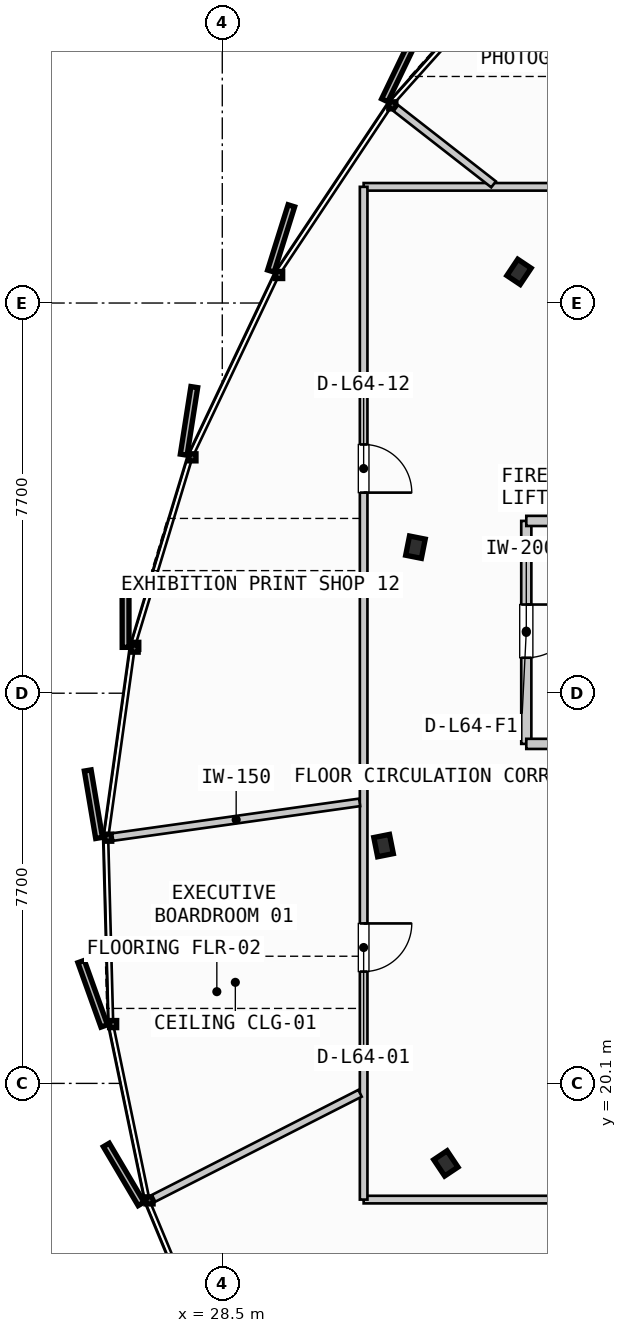
"""IFC4 building model, lengths in metres.
Left out: names, types, materials, properties, quantities, classifications, styles, units other than length and angle.
Written with IfcOpenShell. Run it as: python <this file> out.ifc"""

import sys

from ifc_helpers import new_model, si_unit, direction, frame, frame_2d, origin, origin_2d, place, context, subcontext, project, spatial, rectangle, i_section, extrude, source, transform, mapped, element, fill, save


model = new_model("IFC4")
c1 = context("Model", 3, precision=1e-05, world=origin(), true_north=direction((0.0, 1.0)))
c2 = subcontext(c1, "Body", "Model", "MODEL_VIEW")
j1 = project(units=[si_unit("LENGTHUNIT", "METRE"), si_unit("PLANEANGLEUNIT", "RADIAN")], contexts=[c1])
p1 = place(None, origin())
s1 = spatial("IfcSite", under=j1, at=p1, CompositionType="ELEMENT")
p2 = place(p1, origin())
s2 = spatial("IfcBuilding", under=s1, at=p2, CompositionType="ELEMENT")
p3 = place(p2, frame((0.0, 0.0, 245.65)))
s3 = spatial("IfcBuildingStorey", under=s2, at=p3, CompositionType="ELEMENT", Elevation=245.65)
m1 = source(origin(), c2, "Body", "SweptSolid", [
    extrude(i_section(OverallWidth=0.387, OverallDepth=0.316, WebThickness=0.019, FlangeThickness=0.028, FilletRadius=0.015, at=origin_2d()), origin(), (0.0, 0.0, 1.0), 3.21),
])
for number, where, z_axis, x_axis in (
    (1, (34.356, 36.115, 0.0), (0.0, 0.0, 1.0), (-0.831, 0.556, 0.0)),
    (2, (32.312, 30.682, 0.0), (0.0, 0.0, 1.0), (-0.981, 0.195, 0.0)),
    (3, (31.683, 24.793, 0.0), (0.0, 0.0, 1.0), (-0.981, -0.195, 0.0)),
    (4, (32.913, 18.521, 0.0), (0.0, 0.0, 1.0), (-0.831, -0.556, 0.0)),
):
    element("IfcColumn", number, at=place(p3, frame(where, z_axis=z_axis, x_axis=x_axis)), inside=s3, PredefinedType="COLUMN", context=c2, shape_type="MappedRepresentation", body=[
        mapped(m1, transform((0.0, 0.0, 0.0), scale=1.0)),
    ])
p4 = place(p3, frame((34.5, 31.2, 0.0), z_axis=(0.0, 0.0, 1.0), x_axis=(0.0, -1.0, 0.0)))
e5 = element("IfcWall", 5, at=p4, inside=s3, PredefinedType="PARTITIONING", context=c2, shape_type="SweptSolid", body=[
    extrude(rectangle(XDim=4.4, YDim=0.2, at=frame_2d((2.2, 0.0))), origin(), (0.0, 0.0, 1.0), 2.28),
])
p5 = place(p4, frame((1.65, 0.0, 0.0)))
e6 = element("IfcOpeningElement", 6, at=p5, cuts=e5, PredefinedType="OPENING", context=c2, shape_type="SweptSolid", body=[
    extrude(rectangle(XDim=1.05, YDim=2.15, at=frame_2d((0.525, 1.075))), frame((0.0, 0.11, 0.0), z_axis=(0.0, -1.0, 0.0), x_axis=(1.0, 0.0, 0.0)), (0.0, 0.0, 1.0), 0.22),
])
for number, where, z_axis, x_axis in (
    (7, (34.5, 26.8, 0.0), (0.0, 0.0, 1.0), (1.0, 0.0, 0.0)),
    (8, (34.5, 31.2, 0.0), (0.0, 0.0, 1.0), (1.0, 0.0, 0.0)),
):
    element("IfcWall", number, at=place(p3, frame(where, z_axis=z_axis, x_axis=x_axis)), inside=s3, PredefinedType="PARTITIONING", context=c2, shape_type="SweptSolid", body=[
        extrude(rectangle(XDim=3.265, YDim=0.2, at=frame_2d((1.632, 0.0))), origin(), (0.0, 0.0, 1.0), 2.28),
    ])
p6 = place(p3, frame((31.29, 17.807, 0.0), z_axis=(0.0, 0.0, 1.0), x_axis=(1.0, 0.0, 0.0)))
e9 = element("IfcWall", 9, at=p6, inside=s3, PredefinedType="PARTITIONING", context=c2, shape_type="SweptSolid", body=[
    extrude(rectangle(XDim=30.274, YDim=0.15, at=frame_2d((15.137, 0.0))), origin(), (0.0, 0.0, 1.0), 2.28),
])
p7 = place(p6, frame((4.734, 0.0, 0.0)))
e10 = element("IfcOpeningElement", 10, at=p7, cuts=e9, PredefinedType="OPENING", context=c2, shape_type="SweptSolid", body=[
    extrude(rectangle(XDim=0.95, YDim=2.15, at=frame_2d((0.475, 1.075))), frame((0.0, 0.085, 0.0), z_axis=(0.0, -1.0, 0.0), x_axis=(1.0, 0.0, 0.0)), (0.0, 0.0, 1.0), 0.17),
])
p8 = place(p6, frame((11.892, 0.0, 0.0)))
e11 = element("IfcOpeningElement", 11, at=p8, cuts=e9, PredefinedType="OPENING", context=c2, shape_type="SweptSolid", body=[
    extrude(rectangle(XDim=0.95, YDim=2.15, at=frame_2d((0.475, 1.075))), frame((0.0, 0.085, 0.0), z_axis=(0.0, -1.0, 0.0), x_axis=(1.0, 0.0, 0.0)), (0.0, 0.0, 1.0), 0.17),
])
p9 = place(p6, frame((17.453, 0.0, 0.0)))
e12 = element("IfcOpeningElement", 12, at=p9, cuts=e9, PredefinedType="OPENING", context=c2, shape_type="SweptSolid", body=[
    extrude(rectangle(XDim=0.95, YDim=2.15, at=frame_2d((0.475, 1.075))), frame((0.0, 0.085, 0.0), z_axis=(0.0, -1.0, 0.0), x_axis=(1.0, 0.0, 0.0)), (0.0, 0.0, 1.0), 0.17),
])
p10 = place(p6, frame((24.251, 0.0, 0.0)))
e13 = element("IfcOpeningElement", 13, at=p10, cuts=e9, PredefinedType="OPENING", context=c2, shape_type="SweptSolid", body=[
    extrude(rectangle(XDim=0.95, YDim=2.15, at=frame_2d((0.475, 1.075))), frame((0.0, 0.085, 0.0), z_axis=(0.0, -1.0, 0.0), x_axis=(1.0, 0.0, 0.0)), (0.0, 0.0, 1.0), 0.17),
])
p11 = place(p3, frame((61.564, 37.793, 0.0), z_axis=(0.0, 0.0, 1.0), x_axis=(-1.0, 0.0, 0.0)))
e14 = element("IfcWall", 14, at=p11, inside=s3, PredefinedType="PARTITIONING", context=c2, shape_type="SweptSolid", body=[
    extrude(rectangle(XDim=30.274, YDim=0.15, at=frame_2d((15.137, 0.0))), origin(), (0.0, 0.0, 1.0), 2.28),
])
p12 = place(p11, frame((5.589, 0.0, 0.0)))
e15 = element("IfcOpeningElement", 15, at=p12, cuts=e14, PredefinedType="OPENING", context=c2, shape_type="SweptSolid", body=[
    extrude(rectangle(XDim=0.95, YDim=2.15, at=frame_2d((0.475, 1.075))), frame((0.0, 0.085, 0.0), z_axis=(0.0, -1.0, 0.0), x_axis=(1.0, 0.0, 0.0)), (0.0, 0.0, 1.0), 0.17),
])
p13 = place(p11, frame((14.743, 0.0, 0.0)))
e16 = element("IfcOpeningElement", 16, at=p13, cuts=e14, PredefinedType="OPENING", context=c2, shape_type="SweptSolid", body=[
    extrude(rectangle(XDim=0.95, YDim=2.15, at=frame_2d((0.475, 1.075))), frame((0.0, 0.085, 0.0), z_axis=(0.0, -1.0, 0.0), x_axis=(1.0, 0.0, 0.0)), (0.0, 0.0, 1.0), 0.17),
])
p14 = place(p11, frame((23.423, 0.0, 0.0)))
e17 = element("IfcOpeningElement", 17, at=p14, cuts=e14, PredefinedType="OPENING", context=c2, shape_type="SweptSolid", body=[
    extrude(rectangle(XDim=0.95, YDim=2.15, at=frame_2d((0.475, 1.075))), frame((0.0, 0.085, 0.0), z_axis=(0.0, -1.0, 0.0), x_axis=(1.0, 0.0, 0.0)), (0.0, 0.0, 1.0), 0.17),
])
p15 = place(p3, frame((31.29, 37.793, 0.0), z_axis=(0.0, 0.0, 1.0), x_axis=(0.0, -1.0, 0.0)))
e18 = element("IfcWall", 18, at=p15, inside=s3, PredefinedType="PARTITIONING", context=c2, shape_type="SweptSolid", body=[
    extrude(rectangle(XDim=19.986, YDim=0.15, at=frame_2d((9.993, 0.0))), origin(), (0.0, 0.0, 1.0), 2.28),
])
p16 = place(p15, frame((14.536, 0.0, 0.0)))
e19 = element("IfcOpeningElement", 19, at=p16, cuts=e18, PredefinedType="OPENING", context=c2, shape_type="SweptSolid", body=[
    extrude(rectangle(XDim=0.95, YDim=2.15, at=frame_2d((0.475, 1.075))), frame((0.0, 0.085, 0.0), z_axis=(0.0, -1.0, 0.0), x_axis=(1.0, 0.0, 0.0)), (0.0, 0.0, 1.0), 0.17),
])
p17 = place(p15, frame((5.084, 0.0, 0.0)))
e20 = element("IfcOpeningElement", 20, at=p17, cuts=e18, PredefinedType="OPENING", context=c2, shape_type="SweptSolid", body=[
    extrude(rectangle(XDim=0.95, YDim=2.15, at=frame_2d((0.475, 1.075))), frame((0.0, 0.085, 0.0), z_axis=(0.0, -1.0, 0.0), x_axis=(1.0, 0.0, 0.0)), (0.0, 0.0, 1.0), 0.17),
])
p18 = place(p3, frame((31.211, 25.646, 0.0), z_axis=(0.0, 0.0, 1.0), x_axis=(-0.990284031465, -0.139059472982, 0.0)))
e21 = element("IfcWall", 21, at=p18, inside=s3, PredefinedType="PARTITIONING", context=c2, shape_type="SweptSolid", body=[
    extrude(rectangle(XDim=4.921, YDim=0.15, at=frame_2d((2.46, 0.0))), origin(), (0.0, 0.0, 1.0), 2.28),
])
p19 = place(p3, frame((31.219, 19.905, 0.0), z_axis=(0.0, 0.0, 1.0), x_axis=(-0.891296966011, -0.453420024238, 0.0)))
e22 = element("IfcWall", 22, at=p19, inside=s3, PredefinedType="PARTITIONING", context=c2, shape_type="SweptSolid", body=[
    extrude(rectangle(XDim=4.571, YDim=0.15, at=frame_2d((2.285, 0.0))), origin(), (0.0, 0.0, 1.0), 2.28),
])
p20 = place(p3, frame((33.854, 37.842, 0.0), z_axis=(0.0, 0.0, 1.0), x_axis=(-0.788469366892, 0.61507402601, 0.0)))
e23 = element("IfcWall", 23, at=p20, inside=s3, PredefinedType="PARTITIONING", context=c2, shape_type="SweptSolid", body=[
    extrude(rectangle(XDim=2.444, YDim=0.15, at=frame_2d((1.222, 0.0))), origin(), (0.0, 0.0, 1.0), 2.28),
])
m2 = source(origin(), c2, "Body", "SweptSolid", [
    extrude(rectangle(XDim=1.05, YDim=2.15, at=frame_2d((0.525, 1.075))), frame((0.0, 0.025, 0.0), z_axis=(0.0, -1.0, 0.0), x_axis=(1.0, 0.0, 0.0)), (0.0, 0.0, 1.0), 0.05),
])
p21 = place(p5, origin())
e24 = element("IfcDoor", 24, at=p21, inside=s3, OperationType="SINGLE_SWING_LEFT", PredefinedType="DOOR", context=c2, shape_type="MappedRepresentation", body=[
    mapped(m2, transform((0.0, 0.0, 0.0), scale=1.0)),
])
fill(e6, e24)
m3 = source(origin(), c2, "Body", "SweptSolid", [
    extrude(rectangle(XDim=0.95, YDim=2.15, at=frame_2d((0.475, 1.075))), frame((0.0, 0.025, 0.0), z_axis=(0.0, -1.0, 0.0), x_axis=(1.0, 0.0, 0.0)), (0.0, 0.0, 1.0), 0.05),
])
p22 = place(p16, origin())
e25 = element("IfcDoor", 25, at=p22, inside=s3, OperationType="SINGLE_SWING_LEFT", PredefinedType="DOOR", context=c2, shape_type="MappedRepresentation", body=[
    mapped(m3, transform((0.0, 0.0, 0.0), scale=1.0)),
])
fill(e19, e25)
p23 = place(p17, origin())
e26 = element("IfcDoor", 26, at=p23, inside=s3, OperationType="SINGLE_SWING_RIGHT", PredefinedType="DOOR", context=c2, shape_type="MappedRepresentation", body=[
    mapped(m3, transform((0.0, 0.0, 0.0), scale=1.0)),
])
fill(e20, e26)
save(model, sys.argv[1])
